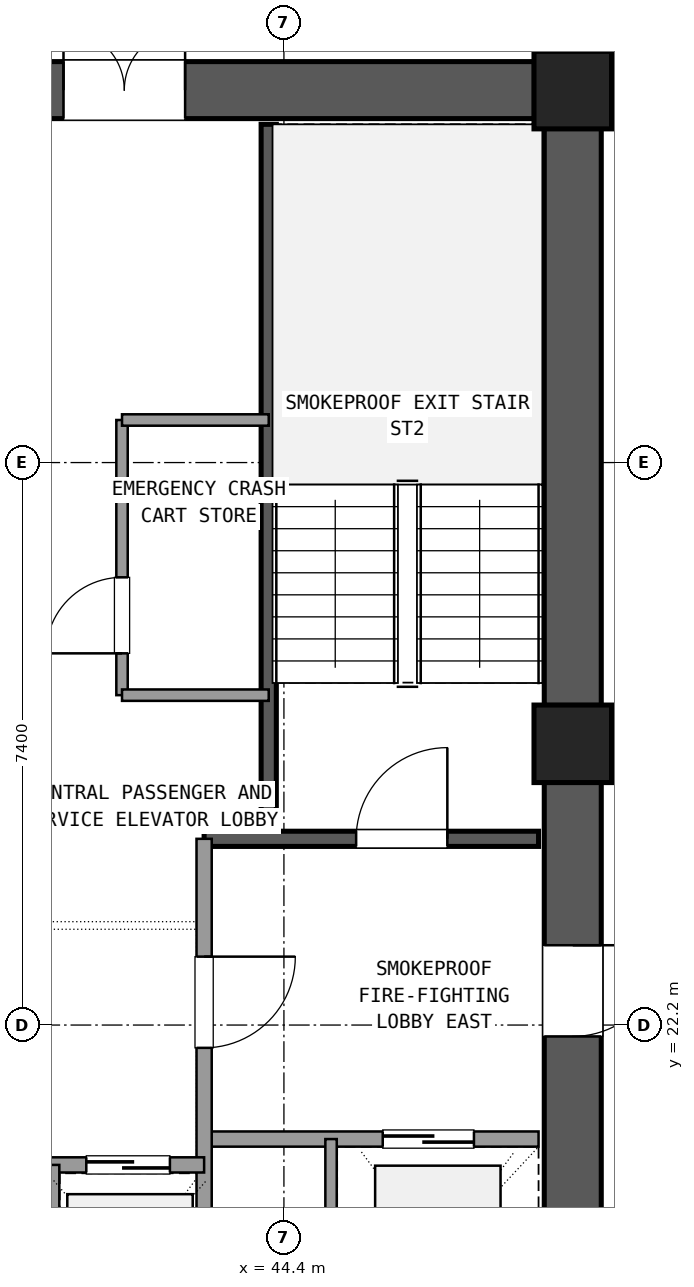
"""IFC4 building model, lengths in metres.
Left out: names, types, materials, properties, quantities, classifications, styles, units other than length and angle.
Written with IfcOpenShell. Run it as: python <this file> out.ifc"""

import sys

from ifc_helpers import new_model, si_unit, direction, frame, frame_2d, origin, origin_2d, place, context, subcontext, project, spatial, rectangle, extrude, element, fill, save


model = new_model("IFC4")
c1 = context("Model", 3, precision=1e-05, world=origin(), true_north=direction((0.0, 1.0)))
c2 = subcontext(c1, "Body", "Model", "MODEL_VIEW")
j1 = project(units=[si_unit("LENGTHUNIT", "METRE"), si_unit("PLANEANGLEUNIT", "RADIAN")], contexts=[c1])
p1 = place(None, origin())
s1 = spatial("IfcSite", under=j1, at=p1, CompositionType="ELEMENT")
p2 = place(p1, origin())
s2 = spatial("IfcBuilding", under=s1, at=p2, CompositionType="ELEMENT")
p3 = place(p2, frame((0.0, 0.0, 160.02)))
s3 = spatial("IfcBuildingStorey", under=s2, at=p3, CompositionType="ELEMENT", Elevation=160.02)
for number, where, z_axis, x_axis in (
    (1, (48.2, 25.9, 0.0), (0.0, 0.0, 1.0), (1.0, 0.0, 0.0)),
    (2, (48.2, 34.5, 0.0), (0.0, 0.0, 1.0), (1.0, 0.0, 0.0)),
):
    element("IfcColumn", number, at=place(p3, frame(where, z_axis=z_axis, x_axis=x_axis)), inside=s3, PredefinedType="COLUMN", context=c2, shape_type="SweptSolid", body=[
        extrude(rectangle(XDim=1.02, YDim=1.02, at=origin_2d()), origin(), (0.0, 0.0, 1.0), 3.6),
    ])
p4 = place(p3, frame((48.2, 17.805, 0.0), z_axis=(0.0, 0.0, 1.0), x_axis=(0.0, 1.0, 0.0)))
e3 = element("IfcWall", 3, at=p4, inside=s3, PredefinedType="SHEAR", context=c2, shape_type="SweptSolid", body=[
    extrude(rectangle(XDim=7.59, YDim=0.75, at=frame_2d((3.795, 0.0))), origin(), (0.0, 0.0, 1.0), 3.32),
])
p5 = place(p4, frame((4.245, 0.0, 0.0)))
e4 = element("IfcOpeningElement", 4, at=p5, cuts=e3, PredefinedType="OPENING", context=c2, shape_type="SweptSolid", body=[
    extrude(rectangle(XDim=1.2, YDim=2.15, at=frame_2d((0.6, 1.075))), frame((0.0, 0.385, 0.0), z_axis=(0.0, -1.0, 0.0), x_axis=(1.0, 0.0, 0.0)), (0.0, 0.0, 1.0), 0.77),
])
p6 = place(p3, frame((48.2, 26.405, 0.0), z_axis=(0.0, 0.0, 1.0), x_axis=(0.0, 1.0, 0.0)))
e5 = element("IfcWall", 5, at=p6, inside=s3, PredefinedType="SHEAR", context=c2, shape_type="SweptSolid", body=[
    extrude(rectangle(XDim=7.59, YDim=0.75, at=frame_2d((3.795, 0.0))), origin(), (0.0, 0.0, 1.0), 3.32),
])
p7 = place(p3, frame((47.695, 34.5, 0.0), z_axis=(0.0, 0.0, 1.0), x_axis=(-1.0, 0.0, 0.0)))
e6 = element("IfcWall", 6, at=p7, inside=s3, PredefinedType="SHEAR", context=c2, shape_type="SweptSolid", body=[
    extrude(rectangle(XDim=10.19, YDim=0.75, at=frame_2d((5.095, 0.0))), origin(), (0.0, 0.0, 1.0), 3.32),
])
p8 = place(p7, frame((4.595, 0.0, 0.0)))
e7 = element("IfcOpeningElement", 7, at=p8, cuts=e6, PredefinedType="OPENING", context=c2, shape_type="SweptSolid", body=[
    extrude(rectangle(XDim=1.6, YDim=2.2, at=frame_2d((0.8, 1.1))), frame((0.0, 0.385, 0.0), z_axis=(0.0, -1.0, 0.0), x_axis=(1.0, 0.0, 0.0)), (0.0, 0.0, 1.0), 0.77),
])
p9 = place(p3, frame((44.2, 24.65, 0.0), z_axis=(0.0, 0.0, 1.0), x_axis=(0.0, 1.0, 0.0)))
e8 = element("IfcWall", 8, at=p9, inside=s3, PredefinedType="SHEAR", context=c2, shape_type="SweptSolid", body=[
    extrude(rectangle(XDim=9.4, YDim=0.2, at=frame_2d((4.7, 0.0))), origin(), (0.0, 0.0, 1.0), 3.32),
])
p10 = place(p3, frame((43.35, 24.65, 0.0), z_axis=(0.0, 0.0, 1.0), x_axis=(1.0, 0.0, 0.0)))
e9 = element("IfcWall", 9, at=p10, inside=s3, PredefinedType="SHEAR", context=c2, shape_type="SweptSolid", body=[
    extrude(rectangle(XDim=4.4, YDim=0.2, at=frame_2d((2.2, 0.0))), origin(), (0.0, 0.0, 1.0), 3.32),
])
p11 = place(p10, frame((2.0, 0.0, 0.0)))
e10 = element("IfcOpeningElement", 10, at=p11, cuts=e9, PredefinedType="OPENING", context=c2, shape_type="SweptSolid", body=[
    extrude(rectangle(XDim=1.2, YDim=2.15, at=frame_2d((0.6, 1.075))), frame((0.0, 0.11, 0.0), z_axis=(0.0, -1.0, 0.0), x_axis=(1.0, 0.0, 0.0)), (0.0, 0.0, 1.0), 0.22),
])
p12 = place(p3, frame((43.35, 20.7, 0.0), z_axis=(0.0, 0.0, 1.0), x_axis=(1.0, 0.0, 0.0)))
e11 = element("IfcWall", 11, at=p12, inside=s3, PredefinedType="SOLIDWALL", context=c2, shape_type="SweptSolid", body=[
    extrude(rectangle(XDim=4.4, YDim=0.2, at=frame_2d((2.2, 0.0))), origin(), (0.0, 0.0, 1.0), 2.61),
])
p13 = place(p12, frame((2.35, 0.0, 0.0)))
e12 = element("IfcOpeningElement", 12, at=p13, cuts=e11, PredefinedType="OPENING", context=c2, shape_type="SweptSolid", body=[
    extrude(rectangle(XDim=1.2, YDim=2.15, at=frame_2d((0.6, 1.075))), frame((0.0, 0.11, 0.0), z_axis=(0.0, -1.0, 0.0), x_axis=(1.0, 0.0, 0.0)), (0.0, 0.0, 1.0), 0.22),
])
p14 = place(p3, frame((43.35, 17.75, 0.0), z_axis=(0.0, 0.0, 1.0), x_axis=(0.0, 1.0, 0.0)))
e13 = element("IfcWall", 13, at=p14, inside=s3, PredefinedType="SOLIDWALL", context=c2, shape_type="SweptSolid", body=[
    extrude(rectangle(XDim=6.9, YDim=0.2, at=frame_2d((3.45, 0.0))), origin(), (0.0, 0.0, 1.0), 2.61),
])
p15 = place(p14, frame((4.15, 0.0, 0.0)))
e14 = element("IfcOpeningElement", 14, at=p15, cuts=e13, PredefinedType="OPENING", context=c2, shape_type="SweptSolid", body=[
    extrude(rectangle(XDim=1.2, YDim=2.15, at=frame_2d((0.6, 1.075))), frame((0.0, 0.11, 0.0), z_axis=(0.0, -1.0, 0.0), x_axis=(1.0, 0.0, 0.0)), (0.0, 0.0, 1.0), 0.22),
])
p16 = place(p3, frame((45.02, 17.75, 0.0), z_axis=(0.0, 0.0, 1.0), x_axis=(0.0, 1.0, 0.0)))
e15 = element("IfcWall", 15, at=p16, inside=s3, PredefinedType="PARTITIONING", context=c2, shape_type="SweptSolid", body=[
    extrude(rectangle(XDim=2.95, YDim=0.15, at=frame_2d((1.475, 0.0))), origin(), (0.0, 0.0, 1.0), 2.61),
])
p17 = place(p3, frame((37.25, 20.36, 0.0), z_axis=(0.0, 0.0, 1.0), x_axis=(1.0, 0.0, 0.0)))
e16 = element("IfcWall", 16, at=p17, inside=s3, PredefinedType="SOLIDWALL", context=c2, shape_type="SweptSolid", body=[
    extrude(rectangle(XDim=6.1, YDim=0.2, at=frame_2d((3.05, 0.0))), origin(), (0.0, 0.0, 1.0), 2.61),
])
p18 = place(p17, frame((0.45, 0.0, 0.0)))
e17 = element("IfcOpeningElement", 17, at=p18, cuts=e16, PredefinedType="OPENING", context=c2, shape_type="SweptSolid", body=[
    extrude(rectangle(XDim=1.1, YDim=2.15, at=frame_2d((0.55, 1.075))), frame((0.0, 0.11, 0.0), z_axis=(0.0, -1.0, 0.0), x_axis=(1.0, 0.0, 0.0)), (0.0, 0.0, 1.0), 0.22),
])
p19 = place(p17, frame((2.5, 0.0, 0.0)))
e18 = element("IfcOpeningElement", 18, at=p19, cuts=e16, PredefinedType="OPENING", context=c2, shape_type="SweptSolid", body=[
    extrude(rectangle(XDim=1.1, YDim=2.15, at=frame_2d((0.55, 1.075))), frame((0.0, 0.11, 0.0), z_axis=(0.0, -1.0, 0.0), x_axis=(1.0, 0.0, 0.0)), (0.0, 0.0, 1.0), 0.22),
])
p20 = place(p17, frame((4.55, 0.0, 0.0)))
e19 = element("IfcOpeningElement", 19, at=p20, cuts=e16, PredefinedType="OPENING", context=c2, shape_type="SweptSolid", body=[
    extrude(rectangle(XDim=1.1, YDim=2.15, at=frame_2d((0.55, 1.075))), frame((0.0, 0.11, 0.0), z_axis=(0.0, -1.0, 0.0), x_axis=(1.0, 0.0, 0.0)), (0.0, 0.0, 1.0), 0.22),
])
p21 = place(p3, frame((41.37, 17.75, 0.0), z_axis=(0.0, 0.0, 1.0), x_axis=(0.0, 1.0, 0.0)))
e20 = element("IfcWall", 20, at=p21, inside=s3, PredefinedType="PARTITIONING", context=c2, shape_type="SweptSolid", body=[
    extrude(rectangle(XDim=2.61, YDim=0.15, at=frame_2d((1.305, 0.0))), origin(), (0.0, 0.0, 1.0), 2.61),
])
p22 = place(p3, frame((42.27, 26.54, 0.0), z_axis=(0.0, 0.0, 1.0), x_axis=(0.0, 1.0, 0.0)))
e21 = element("IfcWall", 21, at=p22, inside=s3, PredefinedType="PARTITIONING", context=c2, shape_type="SweptSolid", body=[
    extrude(rectangle(XDim=3.62, YDim=0.15, at=frame_2d((1.81, 0.0))), origin(), (0.0, 0.0, 1.0), 2.61),
])
p23 = place(p22, frame((0.55, 0.0, 0.0)))
e22 = element("IfcOpeningElement", 22, at=p23, cuts=e21, PredefinedType="OPENING", context=c2, shape_type="SweptSolid", body=[
    extrude(rectangle(XDim=1.0, YDim=2.15, at=frame_2d((0.5, 1.075))), frame((0.0, 0.085, 0.0), z_axis=(0.0, -1.0, 0.0), x_axis=(1.0, 0.0, 0.0)), (0.0, 0.0, 1.0), 0.17),
])
for number, where, z_axis, x_axis in (
    (23, (42.27, 26.54, 0.0), (0.0, 0.0, 1.0), (1.0, 0.0, 0.0)),
    (24, (42.27, 30.16, 0.0), (0.0, 0.0, 1.0), (1.0, 0.0, 0.0)),
):
    element("IfcWall", number, at=place(p3, frame(where, z_axis=z_axis, x_axis=x_axis)), inside=s3, PredefinedType="PARTITIONING", context=c2, shape_type="SweptSolid", body=[
        extrude(rectangle(XDim=1.93, YDim=0.15, at=frame_2d((0.965, 0.0))), origin(), (0.0, 0.0, 1.0), 2.61),
    ])
p24 = place(p11, origin())
e25 = element("IfcDoor", 25, at=p24, inside=s3, OperationType="SINGLE_SWING_RIGHT", PredefinedType="DOOR", context=c2, shape_type="SweptSolid", body=[
    extrude(rectangle(XDim=1.2, YDim=2.15, at=frame_2d((0.6, 1.075))), frame((0.0, 0.025, 0.0), z_axis=(0.0, -1.0, 0.0), x_axis=(1.0, 0.0, 0.0)), (0.0, 0.0, 1.0), 0.05),
])
fill(e10, e25)
p25 = place(p13, origin())
e26 = element("IfcDoor", 26, at=p25, inside=s3, OperationType="SLIDING_TO_RIGHT", PredefinedType="DOOR", context=c2, shape_type="SweptSolid", body=[
    extrude(rectangle(XDim=1.2, YDim=2.15, at=frame_2d((0.6, 1.075))), frame((0.0, 0.025, 0.0), z_axis=(0.0, -1.0, 0.0), x_axis=(1.0, 0.0, 0.0)), (0.0, 0.0, 1.0), 0.05),
])
fill(e12, e26)
p26 = place(p15, frame((1.2, 0.0, 0.0), z_axis=(0.0, 0.0, 1.0), x_axis=(-1.0, 0.0, 0.0)))
e27 = element("IfcDoor", 27, at=p26, inside=s3, OperationType="SINGLE_SWING_RIGHT", PredefinedType="DOOR", context=c2, shape_type="SweptSolid", body=[
    extrude(rectangle(XDim=1.2, YDim=2.15, at=frame_2d((0.6, 1.075))), frame((0.0, 0.025, 0.0), z_axis=(0.0, -1.0, 0.0), x_axis=(1.0, 0.0, 0.0)), (0.0, 0.0, 1.0), 0.05),
])
fill(e14, e27)
p27 = place(p5, frame((1.2, 0.0, 0.0), z_axis=(0.0, 0.0, 1.0), x_axis=(-1.0, 0.0, 0.0)))
e28 = element("IfcDoor", 28, at=p27, inside=s3, OperationType="SINGLE_SWING_RIGHT", PredefinedType="DOOR", context=c2, shape_type="SweptSolid", body=[
    extrude(rectangle(XDim=1.2, YDim=2.15, at=frame_2d((0.6, 1.075))), frame((0.0, 0.025, 0.0), z_axis=(0.0, -1.0, 0.0), x_axis=(1.0, 0.0, 0.0)), (0.0, 0.0, 1.0), 0.05),
])
fill(e4, e28)
p28 = place(p8, frame((1.6, 0.0, 0.0), z_axis=(0.0, 0.0, 1.0), x_axis=(-1.0, 0.0, 0.0)))
e29 = element("IfcDoor", 29, at=p28, inside=s3, OperationType="DOUBLE_DOOR_SINGLE_SWING", PredefinedType="DOOR", context=c2, shape_type="SweptSolid", body=[
    extrude(rectangle(XDim=1.6, YDim=2.2, at=frame_2d((0.8, 1.1))), frame((0.0, 0.025, 0.0), z_axis=(0.0, -1.0, 0.0), x_axis=(1.0, 0.0, 0.0)), (0.0, 0.0, 1.0), 0.05),
])
fill(e7, e29)
p29 = place(p20, origin())
e30 = element("IfcDoor", 30, at=p29, inside=s3, OperationType="SLIDING_TO_LEFT", PredefinedType="DOOR", context=c2, shape_type="SweptSolid", body=[
    extrude(rectangle(XDim=1.1, YDim=2.15, at=frame_2d((0.55, 1.075))), frame((0.0, 0.025, 0.0), z_axis=(0.0, -1.0, 0.0), x_axis=(1.0, 0.0, 0.0)), (0.0, 0.0, 1.0), 0.05),
])
fill(e19, e30)
p30 = place(p23, origin())
e31 = element("IfcDoor", 31, at=p30, inside=s3, OperationType="SINGLE_SWING_LEFT", PredefinedType="DOOR", context=c2, shape_type="SweptSolid", body=[
    extrude(rectangle(XDim=1.0, YDim=2.15, at=frame_2d((0.5, 1.075))), frame((0.0, 0.025, 0.0), z_axis=(0.0, -1.0, 0.0), x_axis=(1.0, 0.0, 0.0)), (0.0, 0.0, 1.0), 0.05),
])
fill(e22, e31)
save(model, sys.argv[1])
